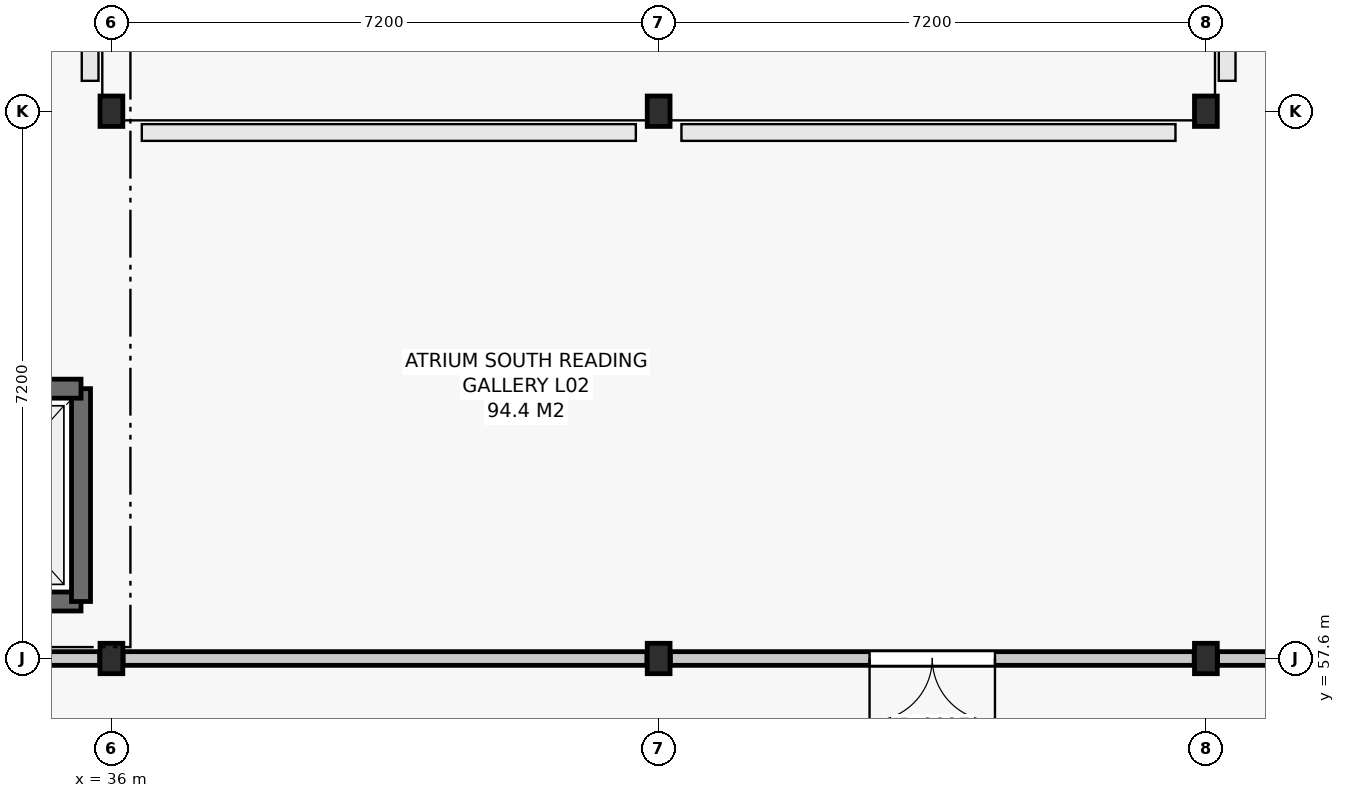
"""IFC4 building model, lengths in metres.
Left out: names, types, materials, properties, quantities, classifications, styles, units other than length and angle.
Written with IfcOpenShell. Run it as: python <this file> out.ifc"""

import sys

from ifc_helpers import new_model, si_unit, direction, frame, frame_2d, origin, origin_2d, place, context, subcontext, project, spatial, rectangle, i_section, extrude, element, fill, save


model = new_model("IFC4")
c1 = context("Model", 3, precision=1e-05, world=origin(), true_north=direction((0.0, 1.0)))
c2 = subcontext(c1, "Body", "Model", "MODEL_VIEW")
j1 = project(units=[si_unit("LENGTHUNIT", "METRE"), si_unit("PLANEANGLEUNIT", "RADIAN")], contexts=[c1])
p1 = place(None, origin())
s1 = spatial("IfcSite", under=j1, at=p1, CompositionType="ELEMENT")
p2 = place(p1, origin())
s2 = spatial("IfcBuilding", under=s1, at=p2, CompositionType="ELEMENT")
p3 = place(p2, frame((0.0, 0.0, 10.2)))
s3 = spatial("IfcBuildingStorey", under=s2, at=p3, CompositionType="ELEMENT", Elevation=10.2)
for number, where, z_axis, x_axis in (
    (1, (36.0, 57.6, 0.0), (0.0, 0.0, 1.0), (1.0, 0.0, 0.0)),
    (2, (36.0, 64.8, 0.0), (0.0, 0.0, 1.0), (1.0, 0.0, 0.0)),
    (3, (43.2, 57.6, 0.0), (0.0, 0.0, 1.0), (1.0, 0.0, 0.0)),
    (4, (43.2, 64.8, 0.0), (0.0, 0.0, 1.0), (1.0, 0.0, 0.0)),
    (5, (50.4, 57.6, 0.0), (0.0, 0.0, 1.0), (1.0, 0.0, 0.0)),
    (6, (50.4, 64.8, 0.0), (0.0, 0.0, 1.0), (1.0, 0.0, 0.0)),
):
    element("IfcColumn", number, at=place(p3, frame(where, z_axis=z_axis, x_axis=x_axis)), inside=s3, PredefinedType="COLUMN", context=c2, shape_type="SweptSolid", body=[
        extrude(i_section(OverallWidth=0.3, OverallDepth=0.4, WebThickness=0.013, FlangeThickness=0.024, FilletRadius=0.027, at=origin_2d()), origin(), (0.0, 0.0, 1.0), 4.2),
    ])
p4 = place(p3, frame((33.05, 58.35, 0.0), z_axis=(0.0, 0.0, 1.0), x_axis=(1.0, 0.0, 0.0)))
e7 = element("IfcWall", 7, at=p4, inside=s3, PredefinedType="SHEAR", context=c2, shape_type="SweptSolid", body=[
    extrude(rectangle(XDim=2.55, YDim=0.25, at=frame_2d((1.275, 0.0))), origin(), (0.0, 0.0, 1.0), 3.92),
])
p5 = place(p3, frame((35.6, 58.35, 0.0), z_axis=(0.0, 0.0, 1.0), x_axis=(0.0, 1.0, 0.0)))
e8 = element("IfcWall", 8, at=p5, inside=s3, PredefinedType="SHEAR", context=c2, shape_type="SweptSolid", body=[
    extrude(rectangle(XDim=2.8, YDim=0.25, at=frame_2d((1.4, 0.0))), origin(), (0.0, 0.0, 1.0), 3.92),
])
p6 = place(p3, frame((35.6, 61.15, 0.0), z_axis=(0.0, 0.0, 1.0), x_axis=(-1.0, 0.0, 0.0)))
e9 = element("IfcWall", 9, at=p6, inside=s3, PredefinedType="SHEAR", context=c2, shape_type="SweptSolid", body=[
    extrude(rectangle(XDim=2.55, YDim=0.25, at=frame_2d((1.275, 0.0))), origin(), (0.0, 0.0, 1.0), 3.92),
])
p7 = place(p6, frame((0.725, 0.0, 0.0)))
e10 = element("IfcOpeningElement", 10, at=p7, cuts=e9, PredefinedType="OPENING", context=c2, shape_type="SweptSolid", body=[
    extrude(rectangle(XDim=1.1, YDim=2.1, at=frame_2d((0.55, 1.05))), frame((0.0, 0.137, 0.0), z_axis=(0.0, -1.0, 0.0), x_axis=(1.0, 0.0, 0.0)), (0.0, 0.0, 1.0), 0.274),
])
for number, where, z_axis, x_axis in (
    (11, (28.954, 57.6, 0.0), (0.0, 0.0, 1.0), (1.0, 0.0, 0.0)),
    (12, (36.154, 57.6, 0.0), (0.0, 0.0, 1.0), (1.0, 0.0, 0.0)),
):
    element("IfcWall", number, at=place(p3, frame(where, z_axis=z_axis, x_axis=x_axis)), inside=s3, PredefinedType="PARTITIONING", context=c2, shape_type="SweptSolid", body=[
        extrude(rectangle(XDim=6.892, YDim=0.18, at=frame_2d((3.446, 0.0))), origin(), (0.0, 0.0, 1.0), 3.535),
    ])
p8 = place(p3, frame((43.354, 57.6, 0.0), z_axis=(0.0, 0.0, 1.0), x_axis=(1.0, 0.0, 0.0)))
e13 = element("IfcWall", 13, at=p8, inside=s3, PredefinedType="PARTITIONING", context=c2, shape_type="SweptSolid", body=[
    extrude(rectangle(XDim=6.892, YDim=0.18, at=frame_2d((3.446, 0.0))), origin(), (0.0, 0.0, 1.0), 3.535),
])
p9 = place(p8, frame((2.621, 0.0, 0.0)))
e14 = element("IfcOpeningElement", 14, at=p9, cuts=e13, PredefinedType="OPENING", context=c2, shape_type="SweptSolid", body=[
    extrude(rectangle(XDim=1.65, YDim=2.25, at=frame_2d((0.825, 1.125))), frame((0.0, 0.102, 0.0), z_axis=(0.0, -1.0, 0.0), x_axis=(1.0, 0.0, 0.0)), (0.0, 0.0, 1.0), 0.204),
])
p10 = place(p3, frame((50.554, 57.6, 0.0), z_axis=(0.0, 0.0, 1.0), x_axis=(1.0, 0.0, 0.0)))
e15 = element("IfcWall", 15, at=p10, inside=s3, PredefinedType="PARTITIONING", context=c2, shape_type="SweptSolid", body=[
    extrude(rectangle(XDim=6.892, YDim=0.18, at=frame_2d((3.446, 0.0))), origin(), (0.0, 0.0, 1.0), 3.535),
])
p11 = place(p9, frame((1.65, 0.0, 0.0), z_axis=(0.0, 0.0, 1.0), x_axis=(-1.0, 0.0, 0.0)))
e16 = element("IfcDoor", 16, at=p11, inside=s3, OperationType="DOUBLE_DOOR_SINGLE_SWING", PredefinedType="DOOR", context=c2, shape_type="SweptSolid", body=[
    extrude(rectangle(XDim=1.65, YDim=2.25, at=frame_2d((0.825, 1.125))), frame((0.0, 0.025, 0.0), z_axis=(0.0, -1.0, 0.0), x_axis=(1.0, 0.0, 0.0)), (0.0, 0.0, 1.0), 0.05),
])
fill(e14, e16)
save(model, sys.argv[1])
